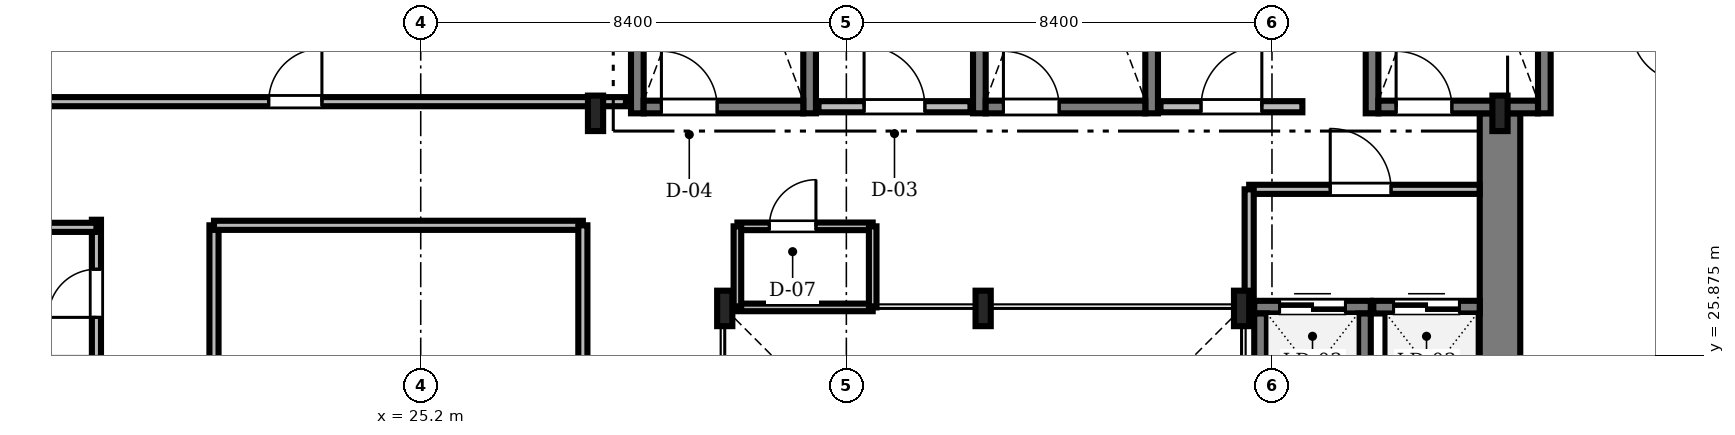
"""IFC4 building model, lengths in metres.
Left out: names, types, materials, properties, quantities, classifications, styles, units other than length and angle.
Written with IfcOpenShell. Run it as: python <this file> out.ifc"""

import sys

from ifc_helpers import new_model, si_unit, direction, frame, frame_2d, origin, origin_2d, place, context, subcontext, project, spatial, rectangle, i_section, extrude, source, transform, mapped, element, fill, save


model = new_model("IFC4")
c1 = context("Model", 3, precision=1e-05, world=origin(), true_north=direction((0.0, 1.0)))
c2 = subcontext(c1, "Body", "Model", "MODEL_VIEW")
j1 = project(units=[si_unit("LENGTHUNIT", "METRE"), si_unit("PLANEANGLEUNIT", "RADIAN")], contexts=[c1])
p1 = place(None, origin())
s1 = spatial("IfcSite", under=j1, at=p1, CompositionType="ELEMENT")
p2 = place(p1, origin())
s2 = spatial("IfcBuilding", under=s1, at=p2, CompositionType="ELEMENT")
p3 = place(p2, frame((0.0, 0.0, 214.8)))
s3 = spatial("IfcBuildingStorey", under=s2, at=p3, CompositionType="ELEMENT", Elevation=214.8)
m1 = source(origin(), c2, "Body", "SweptSolid", [
    extrude(rectangle(XDim=13.15, YDim=0.8, at=frame_2d((6.575, 0.0))), origin(), (0.0, 0.0, 1.0), 3.53),
])
p4 = place(p3, frame((46.5, 17.5, 0.0), z_axis=(0.0, 0.0, 1.0), x_axis=(0.0, 1.0, 0.0)))
e1 = element("IfcWall", 1, at=p4, inside=s3, PredefinedType="SHEAR", context=c2, shape_type="MappedRepresentation", body=[
    mapped(m1, transform((0.0, 0.0, 0.0), scale=1.0)),
])
m2 = source(origin(), c2, "Body", "SweptSolid", [
    extrude(i_section(OverallWidth=0.3, OverallDepth=0.7, WebThickness=0.017, FlangeThickness=0.032, FilletRadius=0.027, at=origin_2d()), origin(), (0.0, 0.0, 1.0), 3.53),
])
for number, where, z_axis, x_axis in (
    (2, (41.4, 26.8, 0.0), (0.0, 0.0, 1.0), (1.0, 0.0, 0.0)),
    (3, (36.3, 26.8, 0.0), (0.0, 0.0, 1.0), (1.0, 0.0, 0.0)),
    (4, (31.2, 26.8, 0.0), (0.0, 0.0, 1.0), (1.0, 0.0, 0.0)),
    (5, (28.65, 30.65, 0.0), (0.0, 0.0, 1.0), (1.0, 0.0, 0.0)),
    (6, (46.5, 30.65, 0.0), (0.0, 0.0, 1.0), (1.0, 0.0, 0.0)),
):
    element("IfcColumn", number, at=place(p3, frame(where, z_axis=z_axis, x_axis=x_axis)), inside=s3, PredefinedType="COLUMN", context=c2, shape_type="MappedRepresentation", body=[
        mapped(m2, transform((0.0, 0.0, 0.0), scale=1.0)),
    ])
m3 = source(origin(), c2, "Body", "SweptSolid", [
    extrude(rectangle(XDim=9.25, YDim=0.25, at=frame_2d((4.625, 0.0))), origin(), (0.0, 0.0, 1.0), 3.55),
])
for number, where, z_axis, x_axis in (
    (7, (29.475, 30.65, 0.0), (0.0, 0.0, 1.0), (0.0, 1.0, 0.0)),
    (8, (32.875, 30.65, 0.0), (0.0, 0.0, 1.0), (0.0, 1.0, 0.0)),
):
    element("IfcWall", number, at=place(p3, frame(where, z_axis=z_axis, x_axis=x_axis)), inside=s3, PredefinedType="SOLIDWALL", context=c2, shape_type="MappedRepresentation", body=[
        mapped(m3, transform((0.0, 0.0, 0.0), scale=1.0)),
    ])
m4 = source(origin(), c2, "Body", "SweptSolid", [
    extrude(rectangle(XDim=3.15, YDim=0.25, at=frame_2d((1.575, 0.0))), origin(), (0.0, 0.0, 1.0), 3.55),
])
p5 = place(p3, frame((29.6, 30.775, 0.0), z_axis=(0.0, 0.0, 1.0), x_axis=(1.0, 0.0, 0.0)))
e9 = element("IfcWall", 9, at=p5, inside=s3, PredefinedType="SOLIDWALL", context=c2, shape_type="MappedRepresentation", body=[
    mapped(m4, transform((0.0, 0.0, 0.0), scale=1.0)),
])
m5 = source(origin(), c2, "Body", "SweptSolid", [
    extrude(rectangle(XDim=1.1, YDim=2.2, at=frame_2d((0.55, 1.1))), frame((0.0, 0.135, 0.0), z_axis=(0.0, -1.0, 0.0), x_axis=(1.0, 0.0, 0.0)), (0.0, 0.0, 1.0), 0.27),
])
p6 = place(p5, frame((0.35, 0.0, 0.0)))
e10 = element("IfcOpeningElement", 10, at=p6, cuts=e9, PredefinedType="OPENING", context=c2, shape_type="MappedRepresentation", body=[
    mapped(m5, transform((0.0, 0.0, 0.0), scale=1.0)),
])
for number, where, z_axis, x_axis in (
    (11, (36.225, 30.65, 0.0), (0.0, 0.0, 1.0), (0.0, 1.0, 0.0)),
    (12, (39.625, 30.65, 0.0), (0.0, 0.0, 1.0), (0.0, 1.0, 0.0)),
):
    element("IfcWall", number, at=place(p3, frame(where, z_axis=z_axis, x_axis=x_axis)), inside=s3, PredefinedType="SOLIDWALL", context=c2, shape_type="MappedRepresentation", body=[
        mapped(m3, transform((0.0, 0.0, 0.0), scale=1.0)),
    ])
p7 = place(p3, frame((36.35, 30.775, 0.0), z_axis=(0.0, 0.0, 1.0), x_axis=(1.0, 0.0, 0.0)))
e13 = element("IfcWall", 13, at=p7, inside=s3, PredefinedType="SOLIDWALL", context=c2, shape_type="MappedRepresentation", body=[
    mapped(m4, transform((0.0, 0.0, 0.0), scale=1.0)),
])
p8 = place(p7, frame((0.35, 0.0, 0.0)))
e14 = element("IfcOpeningElement", 14, at=p8, cuts=e13, PredefinedType="OPENING", context=c2, shape_type="MappedRepresentation", body=[
    mapped(m5, transform((0.0, 0.0, 0.0), scale=1.0)),
])
for number, where, z_axis, x_axis in (
    (15, (43.975, 30.65, 0.0), (0.0, 0.0, 1.0), (0.0, 1.0, 0.0)),
    (16, (47.375, 30.65, 0.0), (0.0, 0.0, 1.0), (0.0, 1.0, 0.0)),
):
    element("IfcWall", number, at=place(p3, frame(where, z_axis=z_axis, x_axis=x_axis)), inside=s3, PredefinedType="SOLIDWALL", context=c2, shape_type="MappedRepresentation", body=[
        mapped(m3, transform((0.0, 0.0, 0.0), scale=1.0)),
    ])
p9 = place(p3, frame((44.1, 30.775, 0.0), z_axis=(0.0, 0.0, 1.0), x_axis=(1.0, 0.0, 0.0)))
e17 = element("IfcWall", 17, at=p9, inside=s3, PredefinedType="SOLIDWALL", context=c2, shape_type="MappedRepresentation", body=[
    mapped(m4, transform((0.0, 0.0, 0.0), scale=1.0)),
])
p10 = place(p9, frame((0.35, 0.0, 0.0)))
e18 = element("IfcOpeningElement", 18, at=p10, cuts=e17, PredefinedType="OPENING", context=c2, shape_type="MappedRepresentation", body=[
    mapped(m5, transform((0.0, 0.0, 0.0), scale=1.0)),
])
m6 = source(origin(), c2, "Body", "SweptSolid", [
    extrude(rectangle(XDim=3.0, YDim=0.22, at=frame_2d((1.5, 0.0))), origin(), (0.0, 0.0, 1.0), 3.53),
])
p11 = place(p3, frame((33.05, 30.78, 0.0), z_axis=(0.0, 0.0, 1.0), x_axis=(1.0, 0.0, 0.0)))
e19 = element("IfcWall", 19, at=p11, inside=s3, PredefinedType="SOLIDWALL", context=c2, shape_type="MappedRepresentation", body=[
    mapped(m6, transform((0.0, 0.0, 0.0), scale=1.0)),
])
m7 = source(origin(), c2, "Body", "SweptSolid", [
    extrude(rectangle(XDim=1.2, YDim=2.2, at=frame_2d((0.6, 1.1))), frame((0.0, 0.12, 0.0), z_axis=(0.0, -1.0, 0.0), x_axis=(1.0, 0.0, 0.0)), (0.0, 0.0, 1.0), 0.24),
])
p12 = place(p11, frame((0.9, 0.0, 0.0)))
e20 = element("IfcOpeningElement", 20, at=p12, cuts=e19, PredefinedType="OPENING", context=c2, shape_type="MappedRepresentation", body=[
    mapped(m7, transform((0.0, 0.0, 0.0), scale=1.0)),
])
m8 = source(origin(), c2, "Body", "SweptSolid", [
    extrude(rectangle(XDim=2.8, YDim=0.22, at=frame_2d((1.4, 0.0))), origin(), (0.0, 0.0, 1.0), 3.53),
])
p13 = place(p3, frame((39.8, 30.78, 0.0), z_axis=(0.0, 0.0, 1.0), x_axis=(1.0, 0.0, 0.0)))
e21 = element("IfcWall", 21, at=p13, inside=s3, PredefinedType="SOLIDWALL", context=c2, shape_type="MappedRepresentation", body=[
    mapped(m8, transform((0.0, 0.0, 0.0), scale=1.0)),
])
p14 = place(p13, frame((0.8, 0.0, 0.0)))
e22 = element("IfcOpeningElement", 22, at=p14, cuts=e21, PredefinedType="OPENING", context=c2, shape_type="MappedRepresentation", body=[
    mapped(m7, transform((0.0, 0.0, 0.0), scale=1.0)),
])
m9 = source(origin(), c2, "Body", "SweptSolid", [
    extrude(rectangle(XDim=2.3, YDim=0.25, at=frame_2d((1.15, 0.0))), origin(), (0.0, 0.0, 1.0), 3.53),
])
p15 = place(p3, frame((41.65, 26.825, 0.0), z_axis=(0.0, 0.0, 1.0), x_axis=(1.0, 0.0, 0.0)))
e23 = element("IfcWall", 23, at=p15, inside=s3, PredefinedType="SOLIDWALL", context=c2, shape_type="MappedRepresentation", body=[
    mapped(m9, transform((0.0, 0.0, 0.0), scale=1.0)),
])
m10 = source(origin(), c2, "Body", "SweptSolid", [
    extrude(rectangle(XDim=1.3, YDim=2.3, at=frame_2d((0.65, 1.15))), frame((0.0, 0.135, 0.0), z_axis=(0.0, -1.0, 0.0), x_axis=(1.0, 0.0, 0.0)), (0.0, 0.0, 1.0), 0.27),
])
p16 = place(p15, frame((0.5, 0.0, 0.0)))
e24 = element("IfcOpeningElement", 24, at=p16, cuts=e23, PredefinedType="OPENING", context=c2, shape_type="MappedRepresentation", body=[
    mapped(m10, transform((0.0, 0.0, 0.0), scale=1.0)),
])
for number, where, z_axis, x_axis in (
    (25, (41.775, 24.4, 0.0), (0.0, 0.0, 1.0), (0.0, 1.0, 0.0)),
    (26, (43.825, 24.4, 0.0), (0.0, 0.0, 1.0), (0.0, 1.0, 0.0)),
):
    element("IfcWall", number, at=place(p3, frame(where, z_axis=z_axis, x_axis=x_axis)), inside=s3, PredefinedType="SOLIDWALL", context=c2, shape_type="MappedRepresentation", body=[
        mapped(m9, transform((0.0, 0.0, 0.0), scale=1.0)),
    ])
m11 = source(origin(), c2, "Body", "SweptSolid", [
    extrude(rectangle(XDim=2.1, YDim=0.25, at=frame_2d((1.05, 0.0))), origin(), (0.0, 0.0, 1.0), 3.53),
])
p17 = place(p3, frame((44.0, 26.825, 0.0), z_axis=(0.0, 0.0, 1.0), x_axis=(1.0, 0.0, 0.0)))
e27 = element("IfcWall", 27, at=p17, inside=s3, PredefinedType="SOLIDWALL", context=c2, shape_type="MappedRepresentation", body=[
    mapped(m11, transform((0.0, 0.0, 0.0), scale=1.0)),
])
p18 = place(p17, frame((0.4, 0.0, 0.0)))
e28 = element("IfcOpeningElement", 28, at=p18, cuts=e27, PredefinedType="OPENING", context=c2, shape_type="MappedRepresentation", body=[
    mapped(m10, transform((0.0, 0.0, 0.0), scale=1.0)),
])
m12 = source(origin(), c2, "Body", "SweptSolid", [
    extrude(rectangle(XDim=17.828, YDim=0.18, at=frame_2d((8.914, 0.0))), origin(), (0.0, 0.0, 1.0), 2.772),
])
p19 = place(p3, frame((11.422, 30.88, 0.0), z_axis=(0.0, 0.0, 1.0), x_axis=(1.0, 0.0, 0.0)))
e29 = element("IfcWall", 29, at=p19, inside=s3, PredefinedType="PARTITIONING", context=c2, shape_type="MappedRepresentation", body=[
    mapped(m12, transform((0.0, 0.0, 0.0), scale=1.0)),
])
m13 = source(origin(), c2, "Body", "SweptSolid", [
    extrude(rectangle(XDim=1.05, YDim=2.2, at=frame_2d((0.525, 1.1))), frame((0.0, 0.1, 0.0), z_axis=(0.0, -1.0, 0.0), x_axis=(1.0, 0.0, 0.0)), (0.0, 0.0, 1.0), 0.2),
])
p20 = place(p19, frame((10.778, 0.0, 0.0)))
e30 = element("IfcOpeningElement", 30, at=p20, cuts=e29, PredefinedType="OPENING", context=c2, shape_type="MappedRepresentation", body=[
    mapped(m13, transform((0.0, 0.0, 0.0), scale=1.0)),
])
m14 = source(origin(), c2, "Body", "SweptSolid", [
    extrude(rectangle(XDim=15.04, YDim=0.18, at=frame_2d((7.52, 0.0))), origin(), (0.0, 0.0, 1.0), 2.972),
])
p21 = place(p3, frame((18.8, 13.51, 0.0), z_axis=(0.0, 0.0, 1.0), x_axis=(0.0, 1.0, 0.0)))
e31 = element("IfcWall", 31, at=p21, inside=s3, PredefinedType="PARTITIONING", context=c2, shape_type="MappedRepresentation", body=[
    mapped(m14, transform((0.0, 0.0, 0.0), scale=1.0)),
])
p22 = place(p21, frame((1.962, 0.0, 0.0)))
e32 = element("IfcOpeningElement", 32, at=p22, cuts=e31, PredefinedType="OPENING", context=c2, shape_type="MappedRepresentation", body=[
    mapped(m13, transform((0.0, 0.0, 0.0), scale=1.0)),
])
m15 = source(origin(), c2, "Body", "SweptSolid", [
    extrude(rectangle(XDim=0.95, YDim=2.15, at=frame_2d((0.475, 1.075))), frame((0.0, 0.1, 0.0), z_axis=(0.0, -1.0, 0.0), x_axis=(1.0, 0.0, 0.0)), (0.0, 0.0, 1.0), 0.2),
])
p23 = place(p21, frame((8.15, 0.0, 0.0)))
e33 = element("IfcOpeningElement", 33, at=p23, cuts=e31, PredefinedType="OPENING", context=c2, shape_type="MappedRepresentation", body=[
    mapped(m15, transform((0.0, 0.0, 0.0), scale=1.0)),
])
p24 = place(p21, frame((13.113, 0.0, 0.0)))
e34 = element("IfcOpeningElement", 34, at=p24, cuts=e31, PredefinedType="OPENING", context=c2, shape_type="MappedRepresentation", body=[
    mapped(m15, transform((0.0, 0.0, 0.0), scale=1.0)),
])
m16 = source(origin(), c2, "Body", "SweptSolid", [
    extrude(rectangle(XDim=6.54, YDim=0.18, at=frame_2d((3.27, 0.0))), origin(), (0.0, 0.0, 1.0), 2.972),
])
p25 = place(p3, frame((21.12, 21.9, 0.0), z_axis=(0.0, 0.0, 1.0), x_axis=(0.0, 1.0, 0.0)))
e35 = element("IfcWall", 35, at=p25, inside=s3, PredefinedType="PARTITIONING", context=c2, shape_type="MappedRepresentation", body=[
    mapped(m16, transform((0.0, 0.0, 0.0), scale=1.0)),
])
p26 = place(p25, frame((2.2, 0.0, 0.0)))
e36 = element("IfcOpeningElement", 36, at=p26, cuts=e35, PredefinedType="OPENING", context=c2, shape_type="MappedRepresentation", body=[
    mapped(m13, transform((0.0, 0.0, 0.0), scale=1.0)),
])
m17 = source(origin(), c2, "Body", "SweptSolid", [
    extrude(rectangle(XDim=4.548, YDim=0.18, at=frame_2d((2.274, 0.0))), origin(), (0.0, 0.0, 1.0), 3.162),
])
p27 = place(p3, frame((41.55, 29.15, 0.0), z_axis=(0.0, 0.0, 1.0), x_axis=(1.0, 0.0, 0.0)))
e37 = element("IfcWall", 37, at=p27, inside=s3, PredefinedType="PARTITIONING", context=c2, shape_type="MappedRepresentation", body=[
    mapped(m17, transform((0.0, 0.0, 0.0), scale=1.0)),
])
m18 = source(origin(), c2, "Body", "SweptSolid", [
    extrude(rectangle(XDim=1.2, YDim=2.2, at=frame_2d((0.6, 1.1))), frame((0.0, 0.1, 0.0), z_axis=(0.0, -1.0, 0.0), x_axis=(1.0, 0.0, 0.0)), (0.0, 0.0, 1.0), 0.2),
])
p28 = place(p27, frame((1.6, 0.0, 0.0)))
e38 = element("IfcOpeningElement", 38, at=p28, cuts=e37, PredefinedType="OPENING", context=c2, shape_type="MappedRepresentation", body=[
    mapped(m18, transform((0.0, 0.0, 0.0), scale=1.0)),
])
m19 = source(origin(), c2, "Body", "SweptSolid", [
    extrude(rectangle(XDim=2.67, YDim=0.15, at=frame_2d((1.335, 0.0))), origin(), (0.0, 0.0, 1.0), 3.162),
])
p29 = place(p3, frame((31.45, 28.42, 0.0), z_axis=(0.0, 0.0, 1.0), x_axis=(1.0, 0.0, 0.0)))
e39 = element("IfcWall", 39, at=p29, inside=s3, PredefinedType="PARTITIONING", context=c2, shape_type="MappedRepresentation", body=[
    mapped(m19, transform((0.0, 0.0, 0.0), scale=1.0)),
])
m20 = source(origin(), c2, "Body", "SweptSolid", [
    extrude(rectangle(XDim=0.92, YDim=2.1, at=frame_2d((0.46, 1.05))), frame((0.0, 0.085, 0.0), z_axis=(0.0, -1.0, 0.0), x_axis=(1.0, 0.0, 0.0)), (0.0, 0.0, 1.0), 0.17),
])
p30 = place(p29, frame((0.63, 0.0, 0.0)))
e40 = element("IfcOpeningElement", 40, at=p30, cuts=e39, PredefinedType="OPENING", context=c2, shape_type="MappedRepresentation", body=[
    mapped(m20, transform((0.0, 0.0, 0.0), scale=1.0)),
])
m21 = source(origin(), c2, "Body", "SweptSolid", [
    extrude(rectangle(XDim=7.57, YDim=0.18, at=frame_2d((3.785, 0.0))), origin(), (0.0, 0.0, 1.0), 2.772),
])
p31 = place(p3, frame((11.23, 28.4, 0.0), z_axis=(0.0, 0.0, 1.0), x_axis=(1.0, 0.0, 0.0)))
e41 = element("IfcWall", 41, at=p31, inside=s3, PredefinedType="PARTITIONING", context=c2, shape_type="MappedRepresentation", body=[
    mapped(m21, transform((0.0, 0.0, 0.0), scale=1.0)),
])
m22 = source(origin(), c2, "Body", "SweptSolid", [
    extrude(rectangle(XDim=7.28, YDim=0.18, at=frame_2d((3.64, 0.0))), origin(), (0.0, 0.0, 1.0), 3.53),
])
p32 = place(p3, frame((21.12, 28.44, 0.0), z_axis=(0.0, 0.0, 1.0), x_axis=(1.0, 0.0, 0.0)))
e42 = element("IfcWall", 42, at=p32, inside=s3, PredefinedType="PARTITIONING", context=c2, shape_type="MappedRepresentation", body=[
    mapped(m22, transform((0.0, 0.0, 0.0), scale=1.0)),
])
p33 = place(p3, frame((28.4, 21.9, 0.0), z_axis=(0.0, 0.0, 1.0), x_axis=(0.0, 1.0, 0.0)))
e43 = element("IfcWall", 43, at=p33, inside=s3, PredefinedType="PARTITIONING", context=c2, shape_type="MappedRepresentation", body=[
    mapped(m16, transform((0.0, 0.0, 0.0), scale=1.0)),
])
m23 = source(origin(), c2, "Body", "SweptSolid", [
    extrude(rectangle(XDim=2.67, YDim=0.15, at=frame_2d((1.335, 0.0))), origin(), (0.0, 0.0, 1.0), 3.072),
])
p34 = place(p3, frame((31.45, 26.82, 0.0), z_axis=(0.0, 0.0, 1.0), x_axis=(1.0, 0.0, 0.0)))
e44 = element("IfcWall", 44, at=p34, inside=s3, PredefinedType="PARTITIONING", context=c2, shape_type="MappedRepresentation", body=[
    mapped(m23, transform((0.0, 0.0, 0.0), scale=1.0)),
])
m24 = source(origin(), c2, "Body", "SweptSolid", [
    extrude(rectangle(XDim=2.35, YDim=0.18, at=frame_2d((1.175, 0.0))), origin(), (0.0, 0.0, 1.0), 2.972),
])
p35 = place(p3, frame((41.55, 26.8, 0.0), z_axis=(0.0, 0.0, 1.0), x_axis=(0.0, 1.0, 0.0)))
e45 = element("IfcWall", 45, at=p35, inside=s3, PredefinedType="PARTITIONING", context=c2, shape_type="MappedRepresentation", body=[
    mapped(m24, transform((0.0, 0.0, 0.0), scale=1.0)),
])
m25 = source(origin(), c2, "Body", "SweptSolid", [
    extrude(rectangle(XDim=1.6, YDim=0.15, at=frame_2d((0.8, 0.0))), origin(), (0.0, 0.0, 1.0), 3.072),
])
for number, where, z_axis, x_axis in (
    (46, (31.45, 26.82, 0.0), (0.0, 0.0, 1.0), (0.0, 1.0, 0.0)),
    (47, (34.12, 26.82, 0.0), (0.0, 0.0, 1.0), (0.0, 1.0, 0.0)),
):
    element("IfcWall", number, at=place(p3, frame(where, z_axis=z_axis, x_axis=x_axis)), inside=s3, PredefinedType="PARTITIONING", context=c2, shape_type="MappedRepresentation", body=[
        mapped(m25, transform((0.0, 0.0, 0.0), scale=1.0)),
    ])
m26 = source(origin(), c2, "Body", "SweptSolid", [
    extrude(rectangle(XDim=1.1, YDim=2.2, at=frame_2d((0.55, 1.1))), frame((0.0, 0.025, 0.0), z_axis=(0.0, -1.0, 0.0), x_axis=(1.0, 0.0, 0.0)), (0.0, 0.0, 1.0), 0.05),
])
p36 = place(p6, origin())
e48 = element("IfcDoor", 48, at=p36, inside=s3, OperationType="SINGLE_SWING_LEFT", PredefinedType="DOOR", context=c2, shape_type="MappedRepresentation", body=[
    mapped(m26, transform((0.0, 0.0, 0.0), scale=1.0)),
])
fill(e10, e48)
p37 = place(p8, origin())
e49 = element("IfcDoor", 49, at=p37, inside=s3, OperationType="SINGLE_SWING_LEFT", PredefinedType="DOOR", context=c2, shape_type="MappedRepresentation", body=[
    mapped(m26, transform((0.0, 0.0, 0.0), scale=1.0)),
])
fill(e14, e49)
p38 = place(p10, origin())
e50 = element("IfcDoor", 50, at=p38, inside=s3, OperationType="SINGLE_SWING_LEFT", PredefinedType="DOOR", context=c2, shape_type="MappedRepresentation", body=[
    mapped(m26, transform((0.0, 0.0, 0.0), scale=1.0)),
])
fill(e18, e50)
m27 = source(origin(), c2, "Body", "SweptSolid", [
    extrude(rectangle(XDim=1.2, YDim=2.2, at=frame_2d((0.6, 1.1))), frame((0.0, 0.025, 0.0), z_axis=(0.0, -1.0, 0.0), x_axis=(1.0, 0.0, 0.0)), (0.0, 0.0, 1.0), 0.05),
])
p39 = place(p12, origin())
e51 = element("IfcDoor", 51, at=p39, inside=s3, OperationType="SINGLE_SWING_LEFT", PredefinedType="DOOR", context=c2, shape_type="MappedRepresentation", body=[
    mapped(m27, transform((0.0, 0.0, 0.0), scale=1.0)),
])
fill(e20, e51)
p40 = place(p14, origin())
e52 = element("IfcDoor", 52, at=p40, inside=s3, OperationType="SINGLE_SWING_RIGHT", PredefinedType="DOOR", context=c2, shape_type="MappedRepresentation", body=[
    mapped(m27, transform((0.0, 0.0, 0.0), scale=1.0)),
])
fill(e22, e52)
m28 = source(origin(), c2, "Body", "SweptSolid", [
    extrude(rectangle(XDim=1.3, YDim=2.3, at=frame_2d((0.65, 1.15))), frame((0.0, 0.025, 0.0), z_axis=(0.0, -1.0, 0.0), x_axis=(1.0, 0.0, 0.0)), (0.0, 0.0, 1.0), 0.05),
])
p41 = place(p16, origin())
e53 = element("IfcDoor", 53, at=p41, inside=s3, OperationType="DOUBLE_DOOR_SLIDING", PredefinedType="DOOR", context=c2, shape_type="MappedRepresentation", body=[
    mapped(m28, transform((0.0, 0.0, 0.0), scale=1.0)),
])
fill(e24, e53)
p42 = place(p18, origin())
e54 = element("IfcDoor", 54, at=p42, inside=s3, OperationType="DOUBLE_DOOR_SLIDING", PredefinedType="DOOR", context=c2, shape_type="MappedRepresentation", body=[
    mapped(m28, transform((0.0, 0.0, 0.0), scale=1.0)),
])
fill(e28, e54)
m29 = source(origin(), c2, "Body", "SweptSolid", [
    extrude(rectangle(XDim=1.05, YDim=2.2, at=frame_2d((0.525, 1.1))), frame((0.0, 0.025, 0.0), z_axis=(0.0, -1.0, 0.0), x_axis=(1.0, 0.0, 0.0)), (0.0, 0.0, 1.0), 0.05),
])
p43 = place(p20, origin())
e55 = element("IfcDoor", 55, at=p43, inside=s3, OperationType="SINGLE_SWING_RIGHT", PredefinedType="DOOR", context=c2, shape_type="MappedRepresentation", body=[
    mapped(m29, transform((0.0, 0.0, 0.0), scale=1.0)),
])
fill(e30, e55)
m30 = source(origin(), c2, "Body", "SweptSolid", [
    extrude(rectangle(XDim=0.95, YDim=2.15, at=frame_2d((0.475, 1.075))), frame((0.0, 0.025, 0.0), z_axis=(0.0, -1.0, 0.0), x_axis=(1.0, 0.0, 0.0)), (0.0, 0.0, 1.0), 0.05),
])
p44 = place(p24, origin())
e56 = element("IfcDoor", 56, at=p44, inside=s3, OperationType="SINGLE_SWING_LEFT", PredefinedType="DOOR", context=c2, shape_type="MappedRepresentation", body=[
    mapped(m30, transform((0.0, 0.0, 0.0), scale=1.0)),
])
fill(e34, e56)
p45 = place(p28, origin())
e57 = element("IfcDoor", 57, at=p45, inside=s3, OperationType="SINGLE_SWING_LEFT", PredefinedType="DOOR", context=c2, shape_type="MappedRepresentation", body=[
    mapped(m27, transform((0.0, 0.0, 0.0), scale=1.0)),
])
fill(e38, e57)
m31 = source(origin(), c2, "Body", "SweptSolid", [
    extrude(rectangle(XDim=0.92, YDim=2.1, at=frame_2d((0.46, 1.05))), frame((0.0, 0.025, 0.0), z_axis=(0.0, -1.0, 0.0), x_axis=(1.0, 0.0, 0.0)), (0.0, 0.0, 1.0), 0.05),
])
p46 = place(p30, origin())
e58 = element("IfcDoor", 58, at=p46, inside=s3, OperationType="SINGLE_SWING_RIGHT", PredefinedType="DOOR", context=c2, shape_type="MappedRepresentation", body=[
    mapped(m31, transform((0.0, 0.0, 0.0), scale=1.0)),
])
fill(e40, e58)
save(model, sys.argv[1])
